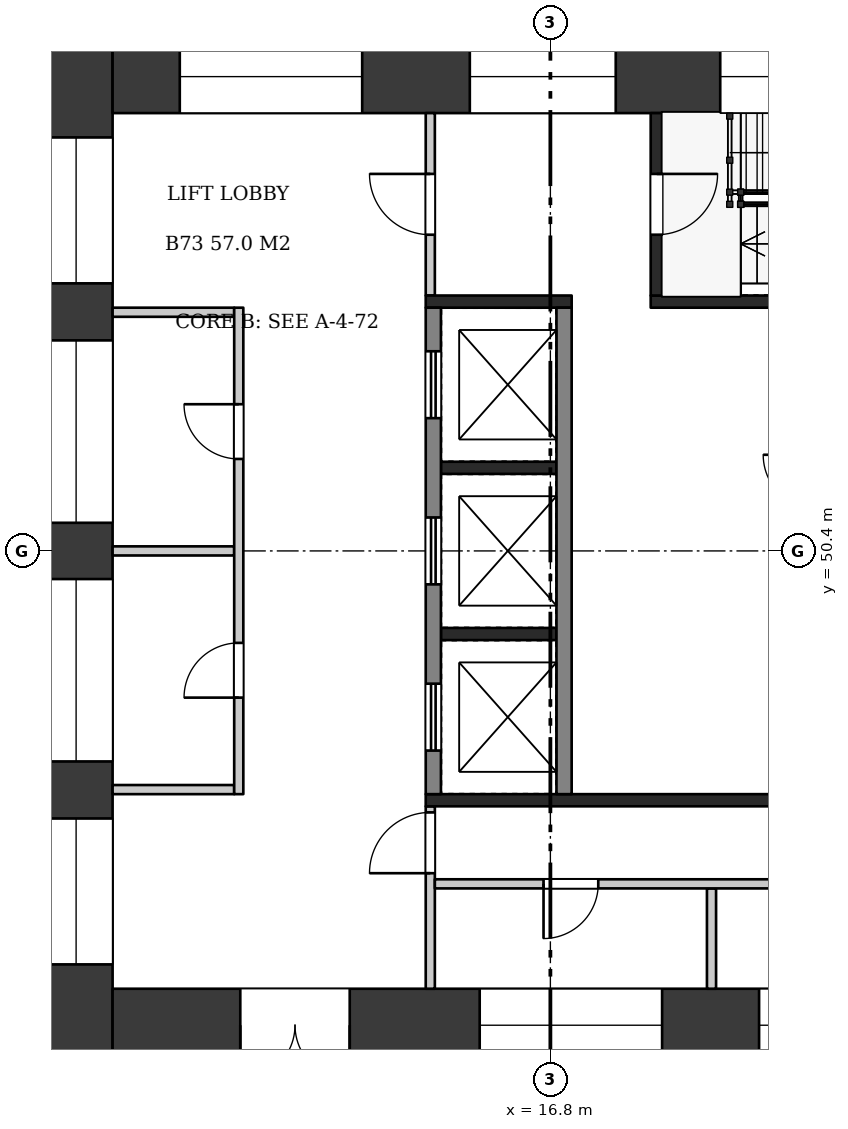
"""IFC4 building model, lengths in metres.
Left out: names, types, materials, properties, quantities, classifications, styles, units other than length and angle.
Written with IfcOpenShell. Run it as: python <this file> out.ifc"""

import sys

from ifc_helpers import new_model, si_unit, direction, frame, frame_2d, origin, origin_2d, place, context, subcontext, project, spatial, rectangle, extrude, element, fill, save


model = new_model("IFC4")
c1 = context("Model", 3, precision=1e-05, world=origin(), true_north=direction((0.0, 1.0)))
c2 = subcontext(c1, "Body", "Model", "MODEL_VIEW")
j1 = project(units=[si_unit("LENGTHUNIT", "METRE"), si_unit("PLANEANGLEUNIT", "RADIAN")], contexts=[c1])
p1 = place(None, origin())
s1 = spatial("IfcSite", under=j1, at=p1, CompositionType="ELEMENT")
p2 = place(p1, origin())
s2 = spatial("IfcBuilding", under=s1, at=p2, CompositionType="ELEMENT")
p3 = place(p2, frame((0.0, 0.0, 277.2)))
s3 = spatial("IfcBuildingStorey", under=s2, at=p3, CompositionType="ELEMENT", Elevation=277.2)
p4 = place(p3, frame((9.0, 58.8, 0.0), z_axis=(0.0, 0.0, 1.0), x_axis=(0.0, -1.0, 0.0)))
e1 = element("IfcWall", 1, at=p4, inside=s3, PredefinedType="SHEAR", context=c2, shape_type="SweptSolid", body=[
    extrude(rectangle(XDim=16.8, YDim=1.2, at=frame_2d((8.4, 0.0))), origin(), (0.0, 0.0, 1.0), 6.58),
])
p5 = place(p4, frame((1.6, 0.0, 0.6)))
e2 = element("IfcOpeningElement", 2, at=p5, cuts=e1, PredefinedType="OPENING", context=c2, shape_type="SweptSolid", body=[
    extrude(rectangle(XDim=2.4, YDim=2.1, at=frame_2d((1.2, 1.05))), frame((0.0, 0.61, 0.0), z_axis=(0.0, -1.0, 0.0), x_axis=(1.0, 0.0, 0.0)), (0.0, 0.0, 1.0), 1.22),
])
p6 = place(p4, frame((4.938, 0.0, 1.6)))
e3 = element("IfcOpeningElement", 3, at=p6, cuts=e1, PredefinedType="OPENING", context=c2, shape_type="SweptSolid", body=[
    extrude(rectangle(XDim=3.0, YDim=1.2, at=frame_2d((1.5, 0.6))), frame((0.0, 0.61, 0.0), z_axis=(0.0, -1.0, 0.0), x_axis=(1.0, 0.0, 0.0)), (0.0, 0.0, 1.0), 1.22),
])
p7 = place(p4, frame((8.863, 0.0, 1.6)))
e4 = element("IfcOpeningElement", 4, at=p7, cuts=e1, PredefinedType="OPENING", context=c2, shape_type="SweptSolid", body=[
    extrude(rectangle(XDim=3.0, YDim=1.2, at=frame_2d((1.5, 0.6))), frame((0.0, 0.61, 0.0), z_axis=(0.0, -1.0, 0.0), x_axis=(1.0, 0.0, 0.0)), (0.0, 0.0, 1.0), 1.22),
])
p8 = place(p4, frame((12.8, 0.0, 0.6)))
e5 = element("IfcOpeningElement", 5, at=p8, cuts=e1, PredefinedType="OPENING", context=c2, shape_type="SweptSolid", body=[
    extrude(rectangle(XDim=2.4, YDim=2.1, at=frame_2d((1.2, 1.05))), frame((0.0, 0.61, 0.0), z_axis=(0.0, -1.0, 0.0), x_axis=(1.0, 0.0, 0.0)), (0.0, 0.0, 1.0), 1.22),
])
p9 = place(p3, frame((9.6, 58.2, 0.0), z_axis=(0.0, 0.0, 1.0), x_axis=(1.0, 0.0, 0.0)))
e6 = element("IfcWall", 6, at=p9, inside=s3, PredefinedType="SHEAR", context=c2, shape_type="SweptSolid", body=[
    extrude(rectangle(XDim=14.4, YDim=1.2, at=frame_2d((7.2, 0.0))), origin(), (0.0, 0.0, 1.0), 6.58),
])
p10 = place(p9, frame((1.105, 0.0, 0.6)))
e7 = element("IfcOpeningElement", 7, at=p10, cuts=e6, PredefinedType="OPENING", context=c2, shape_type="SweptSolid", body=[
    extrude(rectangle(XDim=3.0, YDim=2.1, at=frame_2d((1.5, 1.05))), frame((0.0, 0.61, 0.0), z_axis=(0.0, -1.0, 0.0), x_axis=(1.0, 0.0, 0.0)), (0.0, 0.0, 1.0), 1.22),
])
p11 = place(p9, frame((5.875, 0.0, 0.6)))
e8 = element("IfcOpeningElement", 8, at=p11, cuts=e6, PredefinedType="OPENING", context=c2, shape_type="SweptSolid", body=[
    extrude(rectangle(XDim=2.4, YDim=2.1, at=frame_2d((1.2, 1.05))), frame((0.0, 0.61, 0.0), z_axis=(0.0, -1.0, 0.0), x_axis=(1.0, 0.0, 0.0)), (0.0, 0.0, 1.0), 1.22),
])
p12 = place(p9, frame((9.993, 0.0, 0.5)))
e9 = element("IfcOpeningElement", 9, at=p12, cuts=e6, PredefinedType="OPENING", context=c2, shape_type="SweptSolid", body=[
    extrude(rectangle(XDim=1.2, YDim=2.4, at=frame_2d((0.6, 1.2))), frame((0.0, 0.61, 0.0), z_axis=(0.0, -1.0, 0.0), x_axis=(1.0, 0.0, 0.0)), (0.0, 0.0, 1.0), 1.22),
])
p13 = place(p9, frame((12.197, 0.0, 0.5)))
e10 = element("IfcOpeningElement", 10, at=p13, cuts=e6, PredefinedType="OPENING", context=c2, shape_type="SweptSolid", body=[
    extrude(rectangle(XDim=1.2, YDim=2.4, at=frame_2d((0.6, 1.2))), frame((0.0, 0.61, 0.0), z_axis=(0.0, -1.0, 0.0), x_axis=(1.0, 0.0, 0.0)), (0.0, 0.0, 1.0), 1.22),
])
p14 = place(p3, frame((9.6, 42.6, 0.0), z_axis=(0.0, 0.0, 1.0), x_axis=(1.0, 0.0, 0.0)))
e11 = element("IfcWall", 11, at=p14, inside=s3, PredefinedType="SHEAR", context=c2, shape_type="SweptSolid", body=[
    extrude(rectangle(XDim=14.4, YDim=1.2, at=frame_2d((7.2, 0.0))), origin(), (0.0, 0.0, 1.0), 6.58),
])
p15 = place(p14, frame((2.1, 0.0, 0.0)))
e12 = element("IfcOpeningElement", 12, at=p15, cuts=e11, PredefinedType="OPENING", context=c2, shape_type="SweptSolid", body=[
    extrude(rectangle(XDim=1.8, YDim=2.1, at=frame_2d((0.9, 1.05))), frame((0.0, 0.61, 0.0), z_axis=(0.0, -1.0, 0.0), x_axis=(1.0, 0.0, 0.0)), (0.0, 0.0, 1.0), 1.22),
])
p16 = place(p14, frame((6.038, 0.0, 1.6)))
e13 = element("IfcOpeningElement", 13, at=p16, cuts=e11, PredefinedType="OPENING", context=c2, shape_type="SweptSolid", body=[
    extrude(rectangle(XDim=3.0, YDim=1.2, at=frame_2d((1.5, 0.6))), frame((0.0, 0.61, 0.0), z_axis=(0.0, -1.0, 0.0), x_axis=(1.0, 0.0, 0.0)), (0.0, 0.0, 1.0), 1.22),
])
p17 = place(p14, frame((10.633, 0.0, 1.6)))
e14 = element("IfcOpeningElement", 14, at=p17, cuts=e11, PredefinedType="OPENING", context=c2, shape_type="SweptSolid", body=[
    extrude(rectangle(XDim=3.0, YDim=1.2, at=frame_2d((1.5, 0.6))), frame((0.0, 0.61, 0.0), z_axis=(0.0, -1.0, 0.0), x_axis=(1.0, 0.0, 0.0)), (0.0, 0.0, 1.0), 1.22),
])
for number, where, z_axis, x_axis in (
    (15, (9.6, 54.325, 0.0), (0.0, 0.0, 1.0), (1.0, 0.0, 0.0)),
    (16, (9.6, 46.475, 0.0), (0.0, 0.0, 1.0), (1.0, 0.0, 0.0)),
    (17, (9.6, 50.4, 0.0), (0.0, 0.0, 1.0), (1.0, 0.0, 0.0)),
):
    element("IfcWall", number, at=place(p3, frame(where, z_axis=z_axis, x_axis=x_axis)), inside=s3, PredefinedType="PARTITIONING", context=c2, shape_type="SweptSolid", body=[
        extrude(rectangle(XDim=2.0, YDim=0.15, at=frame_2d((1.0, 0.0))), origin(), (0.0, 0.0, 1.0), 6.58),
    ])
p18 = place(p3, frame((11.675, 54.4, 0.0), z_axis=(0.0, 0.0, 1.0), x_axis=(0.0, -1.0, 0.0)))
e18 = element("IfcWall", 18, at=p18, inside=s3, PredefinedType="PARTITIONING", context=c2, shape_type="SweptSolid", body=[
    extrude(rectangle(XDim=8.0, YDim=0.15, at=frame_2d((4.0, 0.0))), origin(), (0.0, 0.0, 1.0), 6.58),
])
p19 = place(p18, frame((1.587, 0.0, 0.0)))
e19 = element("IfcOpeningElement", 19, at=p19, cuts=e18, PredefinedType="OPENING", context=c2, shape_type="SweptSolid", body=[
    extrude(rectangle(XDim=0.9, YDim=2.1, at=frame_2d((0.45, 1.05))), frame((0.0, 0.085, 0.0), z_axis=(0.0, -1.0, 0.0), x_axis=(1.0, 0.0, 0.0)), (0.0, 0.0, 1.0), 0.17),
])
p20 = place(p18, frame((5.512, 0.0, 0.0)))
e20 = element("IfcOpeningElement", 20, at=p20, cuts=e18, PredefinedType="OPENING", context=c2, shape_type="SweptSolid", body=[
    extrude(rectangle(XDim=0.9, YDim=2.1, at=frame_2d((0.45, 1.05))), frame((0.0, 0.085, 0.0), z_axis=(0.0, -1.0, 0.0), x_axis=(1.0, 0.0, 0.0)), (0.0, 0.0, 1.0), 0.17),
])
for number, where, z_axis, x_axis in (
    (21, (15.0, 51.767, 0.0), (0.0, 0.0, 1.0), (1.0, 0.0, 0.0)),
    (22, (15.0, 49.033, 0.0), (0.0, 0.0, 1.0), (1.0, 0.0, 0.0)),
):
    element("IfcWall", number, at=place(p3, frame(where, z_axis=z_axis, x_axis=x_axis)), inside=s3, PredefinedType="SHEAR", context=c2, shape_type="SweptSolid", body=[
        extrude(rectangle(XDim=1.9, YDim=0.2, at=frame_2d((0.95, 0.0))), origin(), (0.0, 0.0, 1.0), 6.58),
    ])
p21 = place(p3, frame((14.875, 54.4, 0.0), z_axis=(0.0, 0.0, 1.0), x_axis=(0.0, -1.0, 0.0)))
e23 = element("IfcWall", 23, at=p21, inside=s3, PredefinedType="SHEAR", context=c2, shape_type="SweptSolid", body=[
    extrude(rectangle(XDim=8.0, YDim=0.25, at=frame_2d((4.0, 0.0))), origin(), (0.0, 0.0, 1.0), 6.58),
])
p22 = place(p21, frame((0.717, 0.0, 0.0)))
e24 = element("IfcOpeningElement", 24, at=p22, cuts=e23, PredefinedType="OPENING", context=c2, shape_type="SweptSolid", body=[
    extrude(rectangle(XDim=1.1, YDim=2.1, at=frame_2d((0.55, 1.05))), frame((0.0, 0.135, 0.0), z_axis=(0.0, -1.0, 0.0), x_axis=(1.0, 0.0, 0.0)), (0.0, 0.0, 1.0), 0.27),
])
p23 = place(p21, frame((3.45, 0.0, 0.0)))
e25 = element("IfcOpeningElement", 25, at=p23, cuts=e23, PredefinedType="OPENING", context=c2, shape_type="SweptSolid", body=[
    extrude(rectangle(XDim=1.1, YDim=2.1, at=frame_2d((0.55, 1.05))), frame((0.0, 0.135, 0.0), z_axis=(0.0, -1.0, 0.0), x_axis=(1.0, 0.0, 0.0)), (0.0, 0.0, 1.0), 0.27),
])
p24 = place(p21, frame((6.183, 0.0, 0.0)))
e26 = element("IfcOpeningElement", 26, at=p24, cuts=e23, PredefinedType="OPENING", context=c2, shape_type="SweptSolid", body=[
    extrude(rectangle(XDim=1.1, YDim=2.1, at=frame_2d((0.55, 1.05))), frame((0.0, 0.135, 0.0), z_axis=(0.0, -1.0, 0.0), x_axis=(1.0, 0.0, 0.0)), (0.0, 0.0, 1.0), 0.27),
])
p25 = place(p3, frame((17.025, 54.4, 0.0), z_axis=(0.0, 0.0, 1.0), x_axis=(0.0, -1.0, 0.0)))
e27 = element("IfcWall", 27, at=p25, inside=s3, PredefinedType="SHEAR", context=c2, shape_type="SweptSolid", body=[
    extrude(rectangle(XDim=8.0, YDim=0.25, at=frame_2d((4.0, 0.0))), origin(), (0.0, 0.0, 1.0), 6.58),
])
p26 = place(p3, frame((14.75, 54.5, 0.0), z_axis=(0.0, 0.0, 1.0), x_axis=(1.0, 0.0, 0.0)))
e28 = element("IfcWall", 28, at=p26, inside=s3, PredefinedType="SHEAR", context=c2, shape_type="SweptSolid", body=[
    extrude(rectangle(XDim=2.4, YDim=0.2, at=frame_2d((1.2, 0.0))), origin(), (0.0, 0.0, 1.0), 6.58),
])
p27 = place(p3, frame((18.45, 54.5, 0.0), z_axis=(0.0, 0.0, 1.0), x_axis=(1.0, 0.0, 0.0)))
e29 = element("IfcWall", 29, at=p27, inside=s3, PredefinedType="SHEAR", context=c2, shape_type="SweptSolid", body=[
    extrude(rectangle(XDim=5.55, YDim=0.2, at=frame_2d((2.775, 0.0))), origin(), (0.0, 0.0, 1.0), 6.58),
])
p28 = place(p3, frame((14.825, 57.6, 0.0), z_axis=(0.0, 0.0, 1.0), x_axis=(0.0, -1.0, 0.0)))
e30 = element("IfcWall", 30, at=p28, inside=s3, PredefinedType="PARTITIONING", context=c2, shape_type="SweptSolid", body=[
    extrude(rectangle(XDim=3.0, YDim=0.15, at=frame_2d((1.5, 0.0))), origin(), (0.0, 0.0, 1.0), 6.58),
])
p29 = place(p28, frame((1.0, 0.0, 0.0)))
e31 = element("IfcOpeningElement", 31, at=p29, cuts=e30, PredefinedType="OPENING", context=c2, shape_type="SweptSolid", body=[
    extrude(rectangle(XDim=1.0, YDim=2.1, at=frame_2d((0.5, 1.05))), frame((0.0, 0.085, 0.0), z_axis=(0.0, -1.0, 0.0), x_axis=(1.0, 0.0, 0.0)), (0.0, 0.0, 1.0), 0.17),
])
p30 = place(p3, frame((18.55, 57.6, 0.0), z_axis=(0.0, 0.0, 1.0), x_axis=(0.0, -1.0, 0.0)))
e32 = element("IfcWall", 32, at=p30, inside=s3, PredefinedType="SHEAR", context=c2, shape_type="SweptSolid", body=[
    extrude(rectangle(XDim=3.0, YDim=0.2, at=frame_2d((1.5, 0.0))), origin(), (0.0, 0.0, 1.0), 6.58),
])
p31 = place(p30, frame((1.0, 0.0, 0.0)))
e33 = element("IfcOpeningElement", 33, at=p31, cuts=e32, PredefinedType="OPENING", context=c2, shape_type="SweptSolid", body=[
    extrude(rectangle(XDim=1.0, YDim=2.1, at=frame_2d((0.5, 1.05))), frame((0.0, 0.11, 0.0), z_axis=(0.0, -1.0, 0.0), x_axis=(1.0, 0.0, 0.0)), (0.0, 0.0, 1.0), 0.22),
])
p32 = place(p3, frame((14.75, 46.3, 0.0), z_axis=(0.0, 0.0, 1.0), x_axis=(1.0, 0.0, 0.0)))
e34 = element("IfcWall", 34, at=p32, inside=s3, PredefinedType="SHEAR", context=c2, shape_type="SweptSolid", body=[
    extrude(rectangle(XDim=9.25, YDim=0.2, at=frame_2d((4.625, 0.0))), origin(), (0.0, 0.0, 1.0), 6.58),
])
p33 = place(p3, frame((14.825, 46.2, 0.0), z_axis=(0.0, 0.0, 1.0), x_axis=(0.0, -1.0, 0.0)))
e35 = element("IfcWall", 35, at=p33, inside=s3, PredefinedType="PARTITIONING", context=c2, shape_type="SweptSolid", body=[
    extrude(rectangle(XDim=3.0, YDim=0.15, at=frame_2d((1.5, 0.0))), origin(), (0.0, 0.0, 1.0), 6.58),
])
p34 = place(p33, frame((0.1, 0.0, 0.0)))
e36 = element("IfcOpeningElement", 36, at=p34, cuts=e35, PredefinedType="OPENING", context=c2, shape_type="SweptSolid", body=[
    extrude(rectangle(XDim=1.0, YDim=2.1, at=frame_2d((0.5, 1.05))), frame((0.0, 0.085, 0.0), z_axis=(0.0, -1.0, 0.0), x_axis=(1.0, 0.0, 0.0)), (0.0, 0.0, 1.0), 0.17),
])
p35 = place(p3, frame((19.45, 44.85, 0.0), z_axis=(0.0, 0.0, 1.0), x_axis=(0.0, -1.0, 0.0)))
e37 = element("IfcWall", 37, at=p35, inside=s3, PredefinedType="PARTITIONING", context=c2, shape_type="SweptSolid", body=[
    extrude(rectangle(XDim=1.65, YDim=0.15, at=frame_2d((0.825, 0.0))), origin(), (0.0, 0.0, 1.0), 6.58),
])
p36 = place(p3, frame((14.9, 44.925, 0.0), z_axis=(0.0, 0.0, 1.0), x_axis=(1.0, 0.0, 0.0)))
e38 = element("IfcWall", 38, at=p36, inside=s3, PredefinedType="PARTITIONING", context=c2, shape_type="SweptSolid", body=[
    extrude(rectangle(XDim=9.1, YDim=0.15, at=frame_2d((4.55, 0.0))), origin(), (0.0, 0.0, 1.0), 6.58),
])
p37 = place(p36, frame((1.788, 0.0, 0.0)))
e39 = element("IfcOpeningElement", 39, at=p37, cuts=e38, PredefinedType="OPENING", context=c2, shape_type="SweptSolid", body=[
    extrude(rectangle(XDim=0.9, YDim=2.1, at=frame_2d((0.45, 1.05))), frame((0.0, 0.085, 0.0), z_axis=(0.0, -1.0, 0.0), x_axis=(1.0, 0.0, 0.0)), (0.0, 0.0, 1.0), 0.17),
])
p38 = place(p36, frame((6.413, 0.0, 0.0)))
e40 = element("IfcOpeningElement", 40, at=p38, cuts=e38, PredefinedType="OPENING", context=c2, shape_type="SweptSolid", body=[
    extrude(rectangle(XDim=0.9, YDim=2.1, at=frame_2d((0.45, 1.05))), frame((0.0, 0.085, 0.0), z_axis=(0.0, -1.0, 0.0), x_axis=(1.0, 0.0, 0.0)), (0.0, 0.0, 1.0), 0.17),
])
p39 = place(p15, frame((1.8, 0.0, 0.0), z_axis=(0.0, 0.0, 1.0), x_axis=(-1.0, 0.0, 0.0)))
e41 = element("IfcDoor", 41, at=p39, inside=s3, OperationType="DOUBLE_DOOR_SINGLE_SWING", PredefinedType="DOOR", context=c2, shape_type="SweptSolid", body=[
    extrude(rectangle(XDim=1.8, YDim=2.1, at=frame_2d((0.9, 1.05))), frame((0.0, 0.025, 0.0), z_axis=(0.0, -1.0, 0.0), x_axis=(1.0, 0.0, 0.0)), (0.0, 0.0, 1.0), 0.05),
])
fill(e12, e41)
p40 = place(p19, frame((0.9, 0.0, 0.0), z_axis=(0.0, 0.0, 1.0), x_axis=(-1.0, 0.0, 0.0)))
e42 = element("IfcDoor", 42, at=p40, inside=s3, OperationType="SINGLE_SWING_RIGHT", PredefinedType="DOOR", context=c2, shape_type="SweptSolid", body=[
    extrude(rectangle(XDim=0.9, YDim=2.1, at=frame_2d((0.45, 1.05))), frame((0.0, 0.025, 0.0), z_axis=(0.0, -1.0, 0.0), x_axis=(1.0, 0.0, 0.0)), (0.0, 0.0, 1.0), 0.05),
])
fill(e19, e42)
p41 = place(p20, frame((0.9, 0.0, 0.0), z_axis=(0.0, 0.0, 1.0), x_axis=(-1.0, 0.0, 0.0)))
e43 = element("IfcDoor", 43, at=p41, inside=s3, OperationType="SINGLE_SWING_LEFT", PredefinedType="DOOR", context=c2, shape_type="SweptSolid", body=[
    extrude(rectangle(XDim=0.9, YDim=2.1, at=frame_2d((0.45, 1.05))), frame((0.0, 0.025, 0.0), z_axis=(0.0, -1.0, 0.0), x_axis=(1.0, 0.0, 0.0)), (0.0, 0.0, 1.0), 0.05),
])
fill(e20, e43)
p42 = place(p22, origin())
e44 = element("IfcDoor", 44, at=p42, inside=s3, OperationType="DOUBLE_DOOR_SLIDING", PredefinedType="DOOR", context=c2, shape_type="SweptSolid", body=[
    extrude(rectangle(XDim=1.1, YDim=2.1, at=frame_2d((0.55, 1.05))), frame((0.0, 0.025, 0.0), z_axis=(0.0, -1.0, 0.0), x_axis=(1.0, 0.0, 0.0)), (0.0, 0.0, 1.0), 0.05),
])
fill(e24, e44)
p43 = place(p23, origin())
e45 = element("IfcDoor", 45, at=p43, inside=s3, OperationType="DOUBLE_DOOR_SLIDING", PredefinedType="DOOR", context=c2, shape_type="SweptSolid", body=[
    extrude(rectangle(XDim=1.1, YDim=2.1, at=frame_2d((0.55, 1.05))), frame((0.0, 0.025, 0.0), z_axis=(0.0, -1.0, 0.0), x_axis=(1.0, 0.0, 0.0)), (0.0, 0.0, 1.0), 0.05),
])
fill(e25, e45)
p44 = place(p24, origin())
e46 = element("IfcDoor", 46, at=p44, inside=s3, OperationType="DOUBLE_DOOR_SLIDING", PredefinedType="DOOR", context=c2, shape_type="SweptSolid", body=[
    extrude(rectangle(XDim=1.1, YDim=2.1, at=frame_2d((0.55, 1.05))), frame((0.0, 0.025, 0.0), z_axis=(0.0, -1.0, 0.0), x_axis=(1.0, 0.0, 0.0)), (0.0, 0.0, 1.0), 0.05),
])
fill(e26, e46)
p45 = place(p29, frame((1.0, 0.0, 0.0), z_axis=(0.0, 0.0, 1.0), x_axis=(-1.0, 0.0, 0.0)))
e47 = element("IfcDoor", 47, at=p45, inside=s3, OperationType="SINGLE_SWING_RIGHT", PredefinedType="DOOR", context=c2, shape_type="SweptSolid", body=[
    extrude(rectangle(XDim=1.0, YDim=2.1, at=frame_2d((0.5, 1.05))), frame((0.0, 0.025, 0.0), z_axis=(0.0, -1.0, 0.0), x_axis=(1.0, 0.0, 0.0)), (0.0, 0.0, 1.0), 0.05),
])
fill(e31, e47)
p46 = place(p31, origin())
e48 = element("IfcDoor", 48, at=p46, inside=s3, OperationType="SINGLE_SWING_LEFT", PredefinedType="DOOR", context=c2, shape_type="SweptSolid", body=[
    extrude(rectangle(XDim=1.0, YDim=2.1, at=frame_2d((0.5, 1.05))), frame((0.0, 0.025, 0.0), z_axis=(0.0, -1.0, 0.0), x_axis=(1.0, 0.0, 0.0)), (0.0, 0.0, 1.0), 0.05),
])
fill(e33, e48)
p47 = place(p34, frame((1.0, 0.0, 0.0), z_axis=(0.0, 0.0, 1.0), x_axis=(-1.0, 0.0, 0.0)))
e49 = element("IfcDoor", 49, at=p47, inside=s3, OperationType="SINGLE_SWING_LEFT", PredefinedType="DOOR", context=c2, shape_type="SweptSolid", body=[
    extrude(rectangle(XDim=1.0, YDim=2.1, at=frame_2d((0.5, 1.05))), frame((0.0, 0.025, 0.0), z_axis=(0.0, -1.0, 0.0), x_axis=(1.0, 0.0, 0.0)), (0.0, 0.0, 1.0), 0.05),
])
fill(e36, e49)
p48 = place(p37, frame((0.9, 0.0, 0.0), z_axis=(0.0, 0.0, 1.0), x_axis=(-1.0, 0.0, 0.0)))
e50 = element("IfcDoor", 50, at=p48, inside=s3, OperationType="SINGLE_SWING_RIGHT", PredefinedType="DOOR", context=c2, shape_type="SweptSolid", body=[
    extrude(rectangle(XDim=0.9, YDim=2.1, at=frame_2d((0.45, 1.05))), frame((0.0, 0.025, 0.0), z_axis=(0.0, -1.0, 0.0), x_axis=(1.0, 0.0, 0.0)), (0.0, 0.0, 1.0), 0.05),
])
fill(e39, e50)
p49 = place(p5, origin())
e51 = element("IfcWindow", 51, at=p49, inside=s3, PartitioningType="SINGLE_PANEL", PredefinedType="WINDOW", context=c2, shape_type="SweptSolid", body=[
    extrude(rectangle(XDim=2.4, YDim=2.1, at=frame_2d((1.2, 1.05))), frame((0.0, 0.03, 0.0), z_axis=(0.0, -1.0, 0.0), x_axis=(1.0, 0.0, 0.0)), (0.0, 0.0, 1.0), 0.06),
])
fill(e2, e51)
p50 = place(p6, origin())
e52 = element("IfcWindow", 52, at=p50, inside=s3, PartitioningType="SINGLE_PANEL", PredefinedType="WINDOW", context=c2, shape_type="SweptSolid", body=[
    extrude(rectangle(XDim=3.0, YDim=1.2, at=frame_2d((1.5, 0.6))), frame((0.0, 0.03, 0.0), z_axis=(0.0, -1.0, 0.0), x_axis=(1.0, 0.0, 0.0)), (0.0, 0.0, 1.0), 0.06),
])
fill(e3, e52)
p51 = place(p7, origin())
e53 = element("IfcWindow", 53, at=p51, inside=s3, PartitioningType="SINGLE_PANEL", PredefinedType="WINDOW", context=c2, shape_type="SweptSolid", body=[
    extrude(rectangle(XDim=3.0, YDim=1.2, at=frame_2d((1.5, 0.6))), frame((0.0, 0.03, 0.0), z_axis=(0.0, -1.0, 0.0), x_axis=(1.0, 0.0, 0.0)), (0.0, 0.0, 1.0), 0.06),
])
fill(e4, e53)
p52 = place(p8, origin())
e54 = element("IfcWindow", 54, at=p52, inside=s3, PartitioningType="SINGLE_PANEL", PredefinedType="WINDOW", context=c2, shape_type="SweptSolid", body=[
    extrude(rectangle(XDim=2.4, YDim=2.1, at=frame_2d((1.2, 1.05))), frame((0.0, 0.03, 0.0), z_axis=(0.0, -1.0, 0.0), x_axis=(1.0, 0.0, 0.0)), (0.0, 0.0, 1.0), 0.06),
])
fill(e5, e54)
p53 = place(p10, origin())
e55 = element("IfcWindow", 55, at=p53, inside=s3, PartitioningType="SINGLE_PANEL", PredefinedType="WINDOW", context=c2, shape_type="SweptSolid", body=[
    extrude(rectangle(XDim=3.0, YDim=2.1, at=frame_2d((1.5, 1.05))), frame((0.0, 0.03, 0.0), z_axis=(0.0, -1.0, 0.0), x_axis=(1.0, 0.0, 0.0)), (0.0, 0.0, 1.0), 0.06),
])
fill(e7, e55)
p54 = place(p11, origin())
e56 = element("IfcWindow", 56, at=p54, inside=s3, PartitioningType="SINGLE_PANEL", PredefinedType="WINDOW", context=c2, shape_type="SweptSolid", body=[
    extrude(rectangle(XDim=2.4, YDim=2.1, at=frame_2d((1.2, 1.05))), frame((0.0, 0.03, 0.0), z_axis=(0.0, -1.0, 0.0), x_axis=(1.0, 0.0, 0.0)), (0.0, 0.0, 1.0), 0.06),
])
fill(e8, e56)
p55 = place(p12, origin())
e57 = element("IfcWindow", 57, at=p55, inside=s3, PartitioningType="SINGLE_PANEL", PredefinedType="WINDOW", context=c2, shape_type="SweptSolid", body=[
    extrude(rectangle(XDim=1.2, YDim=2.4, at=frame_2d((0.6, 1.2))), frame((0.0, 0.03, 0.0), z_axis=(0.0, -1.0, 0.0), x_axis=(1.0, 0.0, 0.0)), (0.0, 0.0, 1.0), 0.06),
])
fill(e9, e57)
p56 = place(p16, origin())
e58 = element("IfcWindow", 58, at=p56, inside=s3, PartitioningType="SINGLE_PANEL", PredefinedType="WINDOW", context=c2, shape_type="SweptSolid", body=[
    extrude(rectangle(XDim=3.0, YDim=1.2, at=frame_2d((1.5, 0.6))), frame((0.0, 0.03, 0.0), z_axis=(0.0, -1.0, 0.0), x_axis=(1.0, 0.0, 0.0)), (0.0, 0.0, 1.0), 0.06),
])
fill(e13, e58)
p57 = place(p17, origin())
e59 = element("IfcWindow", 59, at=p57, inside=s3, PartitioningType="SINGLE_PANEL", PredefinedType="WINDOW", context=c2, shape_type="SweptSolid", body=[
    extrude(rectangle(XDim=3.0, YDim=1.2, at=frame_2d((1.5, 0.6))), frame((0.0, 0.03, 0.0), z_axis=(0.0, -1.0, 0.0), x_axis=(1.0, 0.0, 0.0)), (0.0, 0.0, 1.0), 0.06),
])
fill(e14, e59)
p58 = place(p2, frame((0.0, 0.0, 287.45)))
p59 = place(p58, frame((0.0, 0.0, -0.25)))
p60 = place(p59, frame((15.95, 50.4, 0.0)))
p61 = place(p60, frame((0.0, 0.0, 0.2)))
e60 = element("IfcWindow", 60, at=p61, inside=s3, PartitioningType="SINGLE_PANEL", PredefinedType="SKYLIGHT", context=c2, shape_type="SweptSolid", body=[
    extrude(rectangle(XDim=0.9, YDim=0.9, at=origin_2d()), origin(), (0.0, 0.0, 1.0), 0.05),
])
save(model, sys.argv[1])
